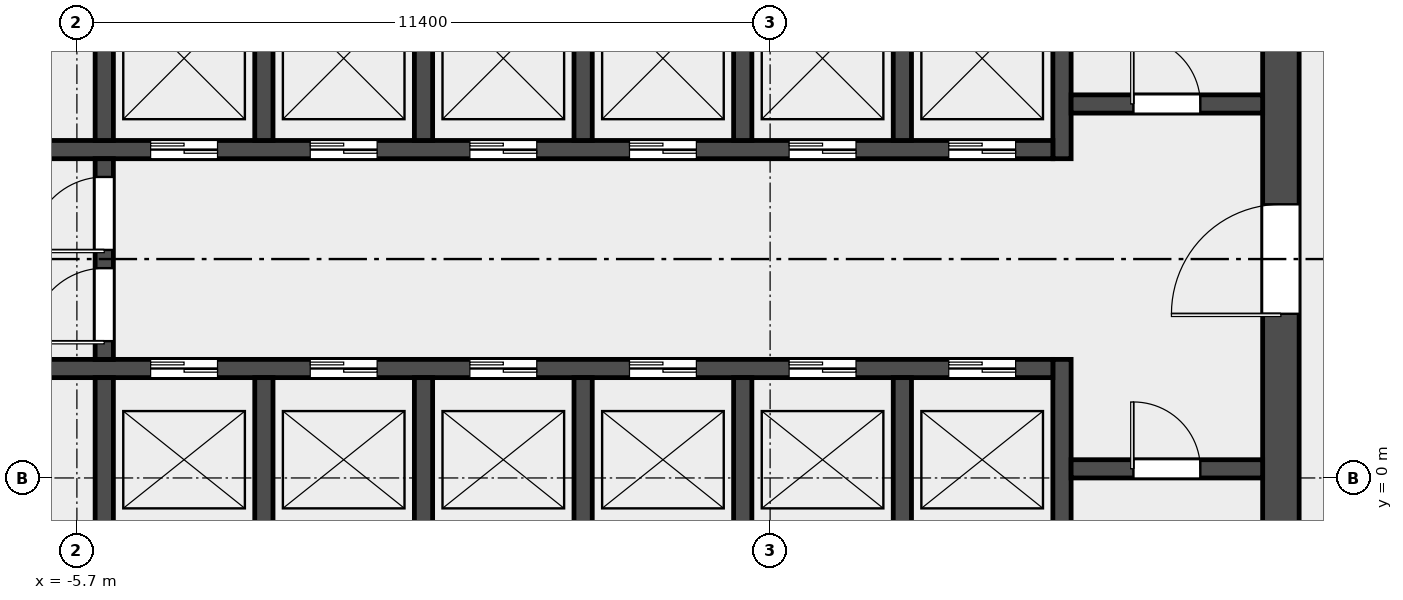
"""IFC4 building model, lengths in metres.
Left out: names, types, materials, properties, quantities, classifications, styles, units other than length and angle.
Written with IfcOpenShell. Run it as: python <this file> out.ifc"""

import sys

from ifc_helpers import new_model, si_unit, direction, frame, frame_2d, origin, place, context, subcontext, project, spatial, rectangle, extrude, element, fill, save


model = new_model("IFC4")
c1 = context("Model", 3, precision=1e-05, world=origin(), true_north=direction((0.0, 1.0)))
c2 = subcontext(c1, "Body", "Model", "MODEL_VIEW")
j1 = project(units=[si_unit("LENGTHUNIT", "METRE"), si_unit("PLANEANGLEUNIT", "RADIAN")], contexts=[c1])
p1 = place(None, origin())
s1 = spatial("IfcSite", under=j1, at=p1, CompositionType="ELEMENT")
p2 = place(p1, origin())
s2 = spatial("IfcBuilding", under=s1, at=p2, CompositionType="ELEMENT")
p3 = place(p2, origin())
s3 = spatial("IfcBuildingStorey", under=s2, at=p3, CompositionType="ELEMENT", Elevation=0.0)
p4 = place(p3, frame((14.1, -6.6, 0.0), z_axis=(0.0, 0.0, 1.0), x_axis=(0.0, 1.0, 0.0)))
e1 = element("IfcWall", 1, at=p4, inside=s3, PredefinedType="SHEAR", context=c2, shape_type="SweptSolid", body=[
    extrude(rectangle(XDim=19.5, YDim=0.6, at=frame_2d((9.75, 0.0))), origin(), (0.0, 0.0, 1.0), 8.7),
])
p5 = place(p4, frame((9.3, 0.0, 0.0)))
e2 = element("IfcOpeningElement", 2, at=p5, cuts=e1, PredefinedType="OPENING", context=c2, shape_type="SweptSolid", body=[
    extrude(rectangle(XDim=1.8, YDim=2.1, at=frame_2d((0.9, 1.05))), frame((0.0, 0.312, 0.0), z_axis=(0.0, -1.0, 0.0), x_axis=(1.0, 0.0, 0.0)), (0.0, 0.0, 1.0), 0.624),
])
p6 = place(p3, frame((10.5, -6.6, 0.0), z_axis=(0.0, 0.0, 1.0), x_axis=(0.0, 1.0, 0.0)))
e3 = element("IfcWall", 3, at=p6, inside=s3, PredefinedType="SHEAR", context=c2, shape_type="SweptSolid", body=[
    extrude(rectangle(XDim=8.55, YDim=0.3, at=frame_2d((4.275, 0.0))), origin(), (0.0, 0.0, 1.0), 8.7),
])
p7 = place(p3, frame((10.5, 5.25, 0.0), z_axis=(0.0, 0.0, 1.0), x_axis=(0.0, 1.0, 0.0)))
e4 = element("IfcWall", 4, at=p7, inside=s3, PredefinedType="SHEAR", context=c2, shape_type="SweptSolid", body=[
    extrude(rectangle(XDim=7.65, YDim=0.3, at=frame_2d((3.825, 0.0))), origin(), (0.0, 0.0, 1.0), 8.7),
])
p8 = place(p3, frame((10.65, 0.15, 0.0), z_axis=(0.0, 0.0, 1.0), x_axis=(1.0, 0.0, 0.0)))
e5 = element("IfcWall", 5, at=p8, inside=s3, PredefinedType="SOLIDWALL", context=c2, shape_type="SweptSolid", body=[
    extrude(rectangle(XDim=3.15, YDim=0.3, at=frame_2d((1.575, 0.0))), origin(), (0.0, 0.0, 1.0), 8.7),
])
p9 = place(p8, frame((1.025, 0.0, 0.0)))
e6 = element("IfcOpeningElement", 6, at=p9, cuts=e5, PredefinedType="OPENING", context=c2, shape_type="SweptSolid", body=[
    extrude(rectangle(XDim=1.1, YDim=2.1, at=frame_2d((0.55, 1.05))), frame((0.0, 0.162, 0.0), z_axis=(0.0, -1.0, 0.0), x_axis=(1.0, 0.0, 0.0)), (0.0, 0.0, 1.0), 0.324),
])
p10 = place(p3, frame((10.65, 6.15, 0.0), z_axis=(0.0, 0.0, 1.0), x_axis=(1.0, 0.0, 0.0)))
e7 = element("IfcWall", 7, at=p10, inside=s3, PredefinedType="SOLIDWALL", context=c2, shape_type="SweptSolid", body=[
    extrude(rectangle(XDim=3.15, YDim=0.3, at=frame_2d((1.575, 0.0))), origin(), (0.0, 0.0, 1.0), 8.7),
])
p11 = place(p10, frame((1.025, 0.0, 0.0)))
e8 = element("IfcOpeningElement", 8, at=p11, cuts=e7, PredefinedType="OPENING", context=c2, shape_type="SweptSolid", body=[
    extrude(rectangle(XDim=1.1, YDim=2.1, at=frame_2d((0.55, 1.05))), frame((0.0, 0.162, 0.0), z_axis=(0.0, -1.0, 0.0), x_axis=(1.0, 0.0, 0.0)), (0.0, 0.0, 1.0), 0.324),
])
p12 = place(p3, frame((-10.35, 1.8, -1.8), z_axis=(0.0, 0.0, 1.0), x_axis=(1.0, 0.0, 0.0)))
e9 = element("IfcWall", 9, at=p12, inside=s3, PredefinedType="SOLIDWALL", context=c2, shape_type="SweptSolid", body=[
    extrude(rectangle(XDim=20.7, YDim=0.3, at=frame_2d((10.35, 0.0))), origin(), (0.0, 0.0, 1.0), 10.5),
])
p13 = place(p12, frame((0.512, 0.0, 1.8)))
e10 = element("IfcOpeningElement", 10, at=p13, cuts=e9, PredefinedType="OPENING", context=c2, shape_type="SweptSolid", body=[
    extrude(rectangle(XDim=1.3, YDim=2.1, at=frame_2d((0.65, 1.05))), frame((0.0, 0.162, 0.0), z_axis=(0.0, -1.0, 0.0), x_axis=(1.0, 0.0, 0.0)), (0.0, 0.0, 1.0), 0.324),
])
p14 = place(p12, frame((5.863, 0.0, 1.8)))
e11 = element("IfcOpeningElement", 11, at=p14, cuts=e9, PredefinedType="OPENING", context=c2, shape_type="SweptSolid", body=[
    extrude(rectangle(XDim=1.1, YDim=2.1, at=frame_2d((0.55, 1.05))), frame((0.0, 0.162, 0.0), z_axis=(0.0, -1.0, 0.0), x_axis=(1.0, 0.0, 0.0)), (0.0, 0.0, 1.0), 0.324),
])
p15 = place(p12, frame((8.488, 0.0, 1.8)))
e12 = element("IfcOpeningElement", 12, at=p15, cuts=e9, PredefinedType="OPENING", context=c2, shape_type="SweptSolid", body=[
    extrude(rectangle(XDim=1.1, YDim=2.1, at=frame_2d((0.55, 1.05))), frame((0.0, 0.162, 0.0), z_axis=(0.0, -1.0, 0.0), x_axis=(1.0, 0.0, 0.0)), (0.0, 0.0, 1.0), 0.324),
])
p16 = place(p12, frame((11.113, 0.0, 1.8)))
e13 = element("IfcOpeningElement", 13, at=p16, cuts=e9, PredefinedType="OPENING", context=c2, shape_type="SweptSolid", body=[
    extrude(rectangle(XDim=1.1, YDim=2.1, at=frame_2d((0.55, 1.05))), frame((0.0, 0.162, 0.0), z_axis=(0.0, -1.0, 0.0), x_axis=(1.0, 0.0, 0.0)), (0.0, 0.0, 1.0), 0.324),
])
p17 = place(p12, frame((13.738, 0.0, 1.8)))
e14 = element("IfcOpeningElement", 14, at=p17, cuts=e9, PredefinedType="OPENING", context=c2, shape_type="SweptSolid", body=[
    extrude(rectangle(XDim=1.1, YDim=2.1, at=frame_2d((0.55, 1.05))), frame((0.0, 0.162, 0.0), z_axis=(0.0, -1.0, 0.0), x_axis=(1.0, 0.0, 0.0)), (0.0, 0.0, 1.0), 0.324),
])
p18 = place(p12, frame((16.363, 0.0, 1.8)))
e15 = element("IfcOpeningElement", 15, at=p18, cuts=e9, PredefinedType="OPENING", context=c2, shape_type="SweptSolid", body=[
    extrude(rectangle(XDim=1.1, YDim=2.1, at=frame_2d((0.55, 1.05))), frame((0.0, 0.162, 0.0), z_axis=(0.0, -1.0, 0.0), x_axis=(1.0, 0.0, 0.0)), (0.0, 0.0, 1.0), 0.324),
])
p19 = place(p12, frame((18.988, 0.0, 1.8)))
e16 = element("IfcOpeningElement", 16, at=p19, cuts=e9, PredefinedType="OPENING", context=c2, shape_type="SweptSolid", body=[
    extrude(rectangle(XDim=1.1, YDim=2.1, at=frame_2d((0.55, 1.05))), frame((0.0, 0.162, 0.0), z_axis=(0.0, -1.0, 0.0), x_axis=(1.0, 0.0, 0.0)), (0.0, 0.0, 1.0), 0.324),
])
p20 = place(p3, frame((-10.35, 5.4, -1.8), z_axis=(0.0, 0.0, 1.0), x_axis=(1.0, 0.0, 0.0)))
e17 = element("IfcWall", 17, at=p20, inside=s3, PredefinedType="SOLIDWALL", context=c2, shape_type="SweptSolid", body=[
    extrude(rectangle(XDim=20.7, YDim=0.3, at=frame_2d((10.35, 0.0))), origin(), (0.0, 0.0, 1.0), 10.5),
])
p21 = place(p20, frame((0.512, 0.0, 1.8)))
e18 = element("IfcOpeningElement", 18, at=p21, cuts=e17, PredefinedType="OPENING", context=c2, shape_type="SweptSolid", body=[
    extrude(rectangle(XDim=1.3, YDim=2.1, at=frame_2d((0.65, 1.05))), frame((0.0, 0.162, 0.0), z_axis=(0.0, -1.0, 0.0), x_axis=(1.0, 0.0, 0.0)), (0.0, 0.0, 1.0), 0.324),
])
p22 = place(p20, frame((5.863, 0.0, 1.8)))
e19 = element("IfcOpeningElement", 19, at=p22, cuts=e17, PredefinedType="OPENING", context=c2, shape_type="SweptSolid", body=[
    extrude(rectangle(XDim=1.1, YDim=2.1, at=frame_2d((0.55, 1.05))), frame((0.0, 0.162, 0.0), z_axis=(0.0, -1.0, 0.0), x_axis=(1.0, 0.0, 0.0)), (0.0, 0.0, 1.0), 0.324),
])
p23 = place(p20, frame((8.488, 0.0, 1.8)))
e20 = element("IfcOpeningElement", 20, at=p23, cuts=e17, PredefinedType="OPENING", context=c2, shape_type="SweptSolid", body=[
    extrude(rectangle(XDim=1.1, YDim=2.1, at=frame_2d((0.55, 1.05))), frame((0.0, 0.162, 0.0), z_axis=(0.0, -1.0, 0.0), x_axis=(1.0, 0.0, 0.0)), (0.0, 0.0, 1.0), 0.324),
])
p24 = place(p20, frame((11.113, 0.0, 1.8)))
e21 = element("IfcOpeningElement", 21, at=p24, cuts=e17, PredefinedType="OPENING", context=c2, shape_type="SweptSolid", body=[
    extrude(rectangle(XDim=1.1, YDim=2.1, at=frame_2d((0.55, 1.05))), frame((0.0, 0.162, 0.0), z_axis=(0.0, -1.0, 0.0), x_axis=(1.0, 0.0, 0.0)), (0.0, 0.0, 1.0), 0.324),
])
p25 = place(p20, frame((13.738, 0.0, 1.8)))
e22 = element("IfcOpeningElement", 22, at=p25, cuts=e17, PredefinedType="OPENING", context=c2, shape_type="SweptSolid", body=[
    extrude(rectangle(XDim=1.1, YDim=2.1, at=frame_2d((0.55, 1.05))), frame((0.0, 0.162, 0.0), z_axis=(0.0, -1.0, 0.0), x_axis=(1.0, 0.0, 0.0)), (0.0, 0.0, 1.0), 0.324),
])
p26 = place(p20, frame((16.363, 0.0, 1.8)))
e23 = element("IfcOpeningElement", 23, at=p26, cuts=e17, PredefinedType="OPENING", context=c2, shape_type="SweptSolid", body=[
    extrude(rectangle(XDim=1.1, YDim=2.1, at=frame_2d((0.55, 1.05))), frame((0.0, 0.162, 0.0), z_axis=(0.0, -1.0, 0.0), x_axis=(1.0, 0.0, 0.0)), (0.0, 0.0, 1.0), 0.324),
])
p27 = place(p20, frame((18.988, 0.0, 1.8)))
e24 = element("IfcOpeningElement", 24, at=p27, cuts=e17, PredefinedType="OPENING", context=c2, shape_type="SweptSolid", body=[
    extrude(rectangle(XDim=1.1, YDim=2.1, at=frame_2d((0.55, 1.05))), frame((0.0, 0.162, 0.0), z_axis=(0.0, -1.0, 0.0), x_axis=(1.0, 0.0, 0.0)), (0.0, 0.0, 1.0), 0.324),
])
for number, where, z_axis, x_axis in (
    (25, (-5.25, -1.05, -1.8), (0.0, 0.0, 1.0), (0.0, 1.0, 0.0)),
    (26, (-2.625, -1.05, -1.8), (0.0, 0.0, 1.0), (0.0, 1.0, 0.0)),
    (27, (0.0, -1.05, -1.8), (0.0, 0.0, 1.0), (0.0, 1.0, 0.0)),
    (28, (2.625, -1.05, -1.8), (0.0, 0.0, 1.0), (0.0, 1.0, 0.0)),
    (29, (5.25, -1.05, -1.8), (0.0, 0.0, 1.0), (0.0, 1.0, 0.0)),
    (30, (7.875, -1.05, -1.8), (0.0, 0.0, 1.0), (0.0, 1.0, 0.0)),
    (31, (-5.25, 5.55, -1.8), (0.0, 0.0, 1.0), (0.0, 1.0, 0.0)),
    (32, (-2.625, 5.55, -1.8), (0.0, 0.0, 1.0), (0.0, 1.0, 0.0)),
    (33, (0.0, 5.55, -1.8), (0.0, 0.0, 1.0), (0.0, 1.0, 0.0)),
    (34, (2.625, 5.55, -1.8), (0.0, 0.0, 1.0), (0.0, 1.0, 0.0)),
    (35, (5.25, 5.55, -1.8), (0.0, 0.0, 1.0), (0.0, 1.0, 0.0)),
    (36, (7.875, 5.55, -1.8), (0.0, 0.0, 1.0), (0.0, 1.0, 0.0)),
):
    element("IfcWall", number, at=place(p3, frame(where, z_axis=z_axis, x_axis=x_axis)), inside=s3, PredefinedType="SOLIDWALL", context=c2, shape_type="SweptSolid", body=[
        extrude(rectangle(XDim=2.7, YDim=0.3, at=frame_2d((1.35, 0.0))), origin(), (0.0, 0.0, 1.0), 10.5),
    ])
p28 = place(p3, frame((-5.25, 1.95, 0.0), z_axis=(0.0, 0.0, 1.0), x_axis=(0.0, 1.0, 0.0)))
e37 = element("IfcWall", 37, at=p28, inside=s3, PredefinedType="SOLIDWALL", context=c2, shape_type="SweptSolid", body=[
    extrude(rectangle(XDim=3.3, YDim=0.3, at=frame_2d((1.65, 0.0))), origin(), (0.0, 0.0, 1.0), 8.7),
])
p29 = place(p28, frame((0.3, 0.0, 0.0)))
e38 = element("IfcOpeningElement", 38, at=p29, cuts=e37, PredefinedType="OPENING", context=c2, shape_type="SweptSolid", body=[
    extrude(rectangle(XDim=1.2, YDim=2.1, at=frame_2d((0.6, 1.05))), frame((0.0, 0.162, 0.0), z_axis=(0.0, -1.0, 0.0), x_axis=(1.0, 0.0, 0.0)), (0.0, 0.0, 1.0), 0.324),
])
p30 = place(p28, frame((1.8, 0.0, 0.0)))
e39 = element("IfcOpeningElement", 39, at=p30, cuts=e37, PredefinedType="OPENING", context=c2, shape_type="SweptSolid", body=[
    extrude(rectangle(XDim=1.2, YDim=2.1, at=frame_2d((0.6, 1.05))), frame((0.0, 0.162, 0.0), z_axis=(0.0, -1.0, 0.0), x_axis=(1.0, 0.0, 0.0)), (0.0, 0.0, 1.0), 0.324),
])
p31 = place(p9, origin())
e40 = element("IfcDoor", 40, at=p31, inside=s3, OperationType="SINGLE_SWING_RIGHT", PredefinedType="DOOR", context=c2, shape_type="SweptSolid", body=[
    extrude(rectangle(XDim=1.1, YDim=2.1, at=frame_2d((0.55, 1.05))), frame((0.0, 0.025, 0.0), z_axis=(0.0, -1.0, 0.0), x_axis=(1.0, 0.0, 0.0)), (0.0, 0.0, 1.0), 0.05),
])
fill(e6, e40)
p32 = place(p11, origin())
e41 = element("IfcDoor", 41, at=p32, inside=s3, OperationType="SINGLE_SWING_RIGHT", PredefinedType="DOOR", context=c2, shape_type="SweptSolid", body=[
    extrude(rectangle(XDim=1.1, YDim=2.1, at=frame_2d((0.55, 1.05))), frame((0.0, 0.025, 0.0), z_axis=(0.0, -1.0, 0.0), x_axis=(1.0, 0.0, 0.0)), (0.0, 0.0, 1.0), 0.05),
])
fill(e8, e41)
p33 = place(p5, origin())
e42 = element("IfcDoor", 42, at=p33, inside=s3, OperationType="DOUBLE_DOOR_SINGLE_SWING", PredefinedType="DOOR", context=c2, shape_type="SweptSolid", body=[
    extrude(rectangle(XDim=1.8, YDim=2.1, at=frame_2d((0.9, 1.05))), frame((0.0, 0.025, 0.0), z_axis=(0.0, -1.0, 0.0), x_axis=(1.0, 0.0, 0.0)), (0.0, 0.0, 1.0), 0.05),
])
fill(e2, e42)
p34 = place(p29, origin())
e43 = element("IfcDoor", 43, at=p34, inside=s3, OperationType="SINGLE_SWING_LEFT", PredefinedType="DOOR", context=c2, shape_type="SweptSolid", body=[
    extrude(rectangle(XDim=1.2, YDim=2.1, at=frame_2d((0.6, 1.05))), frame((0.0, 0.025, 0.0), z_axis=(0.0, -1.0, 0.0), x_axis=(1.0, 0.0, 0.0)), (0.0, 0.0, 1.0), 0.05),
])
fill(e38, e43)
p35 = place(p30, origin())
e44 = element("IfcDoor", 44, at=p35, inside=s3, OperationType="SINGLE_SWING_RIGHT", PredefinedType="DOOR", context=c2, shape_type="SweptSolid", body=[
    extrude(rectangle(XDim=1.2, YDim=2.1, at=frame_2d((0.6, 1.05))), frame((0.0, 0.025, 0.0), z_axis=(0.0, -1.0, 0.0), x_axis=(1.0, 0.0, 0.0)), (0.0, 0.0, 1.0), 0.05),
])
fill(e39, e44)
p36 = place(p14, origin())
e45 = element("IfcDoor", 45, at=p36, inside=s3, OperationType="DOUBLE_DOOR_SLIDING", PredefinedType="DOOR", context=c2, shape_type="SweptSolid", body=[
    extrude(rectangle(XDim=1.1, YDim=2.1, at=frame_2d((0.55, 1.05))), frame((0.0, 0.025, 0.0), z_axis=(0.0, -1.0, 0.0), x_axis=(1.0, 0.0, 0.0)), (0.0, 0.0, 1.0), 0.05),
])
fill(e11, e45)
p37 = place(p15, origin())
e46 = element("IfcDoor", 46, at=p37, inside=s3, OperationType="DOUBLE_DOOR_SLIDING", PredefinedType="DOOR", context=c2, shape_type="SweptSolid", body=[
    extrude(rectangle(XDim=1.1, YDim=2.1, at=frame_2d((0.55, 1.05))), frame((0.0, 0.025, 0.0), z_axis=(0.0, -1.0, 0.0), x_axis=(1.0, 0.0, 0.0)), (0.0, 0.0, 1.0), 0.05),
])
fill(e12, e46)
p38 = place(p16, origin())
e47 = element("IfcDoor", 47, at=p38, inside=s3, OperationType="DOUBLE_DOOR_SLIDING", PredefinedType="DOOR", context=c2, shape_type="SweptSolid", body=[
    extrude(rectangle(XDim=1.1, YDim=2.1, at=frame_2d((0.55, 1.05))), frame((0.0, 0.025, 0.0), z_axis=(0.0, -1.0, 0.0), x_axis=(1.0, 0.0, 0.0)), (0.0, 0.0, 1.0), 0.05),
])
fill(e13, e47)
p39 = place(p17, origin())
e48 = element("IfcDoor", 48, at=p39, inside=s3, OperationType="DOUBLE_DOOR_SLIDING", PredefinedType="DOOR", context=c2, shape_type="SweptSolid", body=[
    extrude(rectangle(XDim=1.1, YDim=2.1, at=frame_2d((0.55, 1.05))), frame((0.0, 0.025, 0.0), z_axis=(0.0, -1.0, 0.0), x_axis=(1.0, 0.0, 0.0)), (0.0, 0.0, 1.0), 0.05),
])
fill(e14, e48)
p40 = place(p18, origin())
e49 = element("IfcDoor", 49, at=p40, inside=s3, OperationType="DOUBLE_DOOR_SLIDING", PredefinedType="DOOR", context=c2, shape_type="SweptSolid", body=[
    extrude(rectangle(XDim=1.1, YDim=2.1, at=frame_2d((0.55, 1.05))), frame((0.0, 0.025, 0.0), z_axis=(0.0, -1.0, 0.0), x_axis=(1.0, 0.0, 0.0)), (0.0, 0.0, 1.0), 0.05),
])
fill(e15, e49)
p41 = place(p19, origin())
e50 = element("IfcDoor", 50, at=p41, inside=s3, OperationType="DOUBLE_DOOR_SLIDING", PredefinedType="DOOR", context=c2, shape_type="SweptSolid", body=[
    extrude(rectangle(XDim=1.1, YDim=2.1, at=frame_2d((0.55, 1.05))), frame((0.0, 0.025, 0.0), z_axis=(0.0, -1.0, 0.0), x_axis=(1.0, 0.0, 0.0)), (0.0, 0.0, 1.0), 0.05),
])
fill(e16, e50)
p42 = place(p22, origin())
e51 = element("IfcDoor", 51, at=p42, inside=s3, OperationType="DOUBLE_DOOR_SLIDING", PredefinedType="DOOR", context=c2, shape_type="SweptSolid", body=[
    extrude(rectangle(XDim=1.1, YDim=2.1, at=frame_2d((0.55, 1.05))), frame((0.0, 0.025, 0.0), z_axis=(0.0, -1.0, 0.0), x_axis=(1.0, 0.0, 0.0)), (0.0, 0.0, 1.0), 0.05),
])
fill(e19, e51)
p43 = place(p23, origin())
e52 = element("IfcDoor", 52, at=p43, inside=s3, OperationType="DOUBLE_DOOR_SLIDING", PredefinedType="DOOR", context=c2, shape_type="SweptSolid", body=[
    extrude(rectangle(XDim=1.1, YDim=2.1, at=frame_2d((0.55, 1.05))), frame((0.0, 0.025, 0.0), z_axis=(0.0, -1.0, 0.0), x_axis=(1.0, 0.0, 0.0)), (0.0, 0.0, 1.0), 0.05),
])
fill(e20, e52)
p44 = place(p24, origin())
e53 = element("IfcDoor", 53, at=p44, inside=s3, OperationType="DOUBLE_DOOR_SLIDING", PredefinedType="DOOR", context=c2, shape_type="SweptSolid", body=[
    extrude(rectangle(XDim=1.1, YDim=2.1, at=frame_2d((0.55, 1.05))), frame((0.0, 0.025, 0.0), z_axis=(0.0, -1.0, 0.0), x_axis=(1.0, 0.0, 0.0)), (0.0, 0.0, 1.0), 0.05),
])
fill(e21, e53)
p45 = place(p25, origin())
e54 = element("IfcDoor", 54, at=p45, inside=s3, OperationType="DOUBLE_DOOR_SLIDING", PredefinedType="DOOR", context=c2, shape_type="SweptSolid", body=[
    extrude(rectangle(XDim=1.1, YDim=2.1, at=frame_2d((0.55, 1.05))), frame((0.0, 0.025, 0.0), z_axis=(0.0, -1.0, 0.0), x_axis=(1.0, 0.0, 0.0)), (0.0, 0.0, 1.0), 0.05),
])
fill(e22, e54)
p46 = place(p26, origin())
e55 = element("IfcDoor", 55, at=p46, inside=s3, OperationType="DOUBLE_DOOR_SLIDING", PredefinedType="DOOR", context=c2, shape_type="SweptSolid", body=[
    extrude(rectangle(XDim=1.1, YDim=2.1, at=frame_2d((0.55, 1.05))), frame((0.0, 0.025, 0.0), z_axis=(0.0, -1.0, 0.0), x_axis=(1.0, 0.0, 0.0)), (0.0, 0.0, 1.0), 0.05),
])
fill(e23, e55)
p47 = place(p27, origin())
e56 = element("IfcDoor", 56, at=p47, inside=s3, OperationType="DOUBLE_DOOR_SLIDING", PredefinedType="DOOR", context=c2, shape_type="SweptSolid", body=[
    extrude(rectangle(XDim=1.1, YDim=2.1, at=frame_2d((0.55, 1.05))), frame((0.0, 0.025, 0.0), z_axis=(0.0, -1.0, 0.0), x_axis=(1.0, 0.0, 0.0)), (0.0, 0.0, 1.0), 0.05),
])
fill(e24, e56)
save(model, sys.argv[1])
